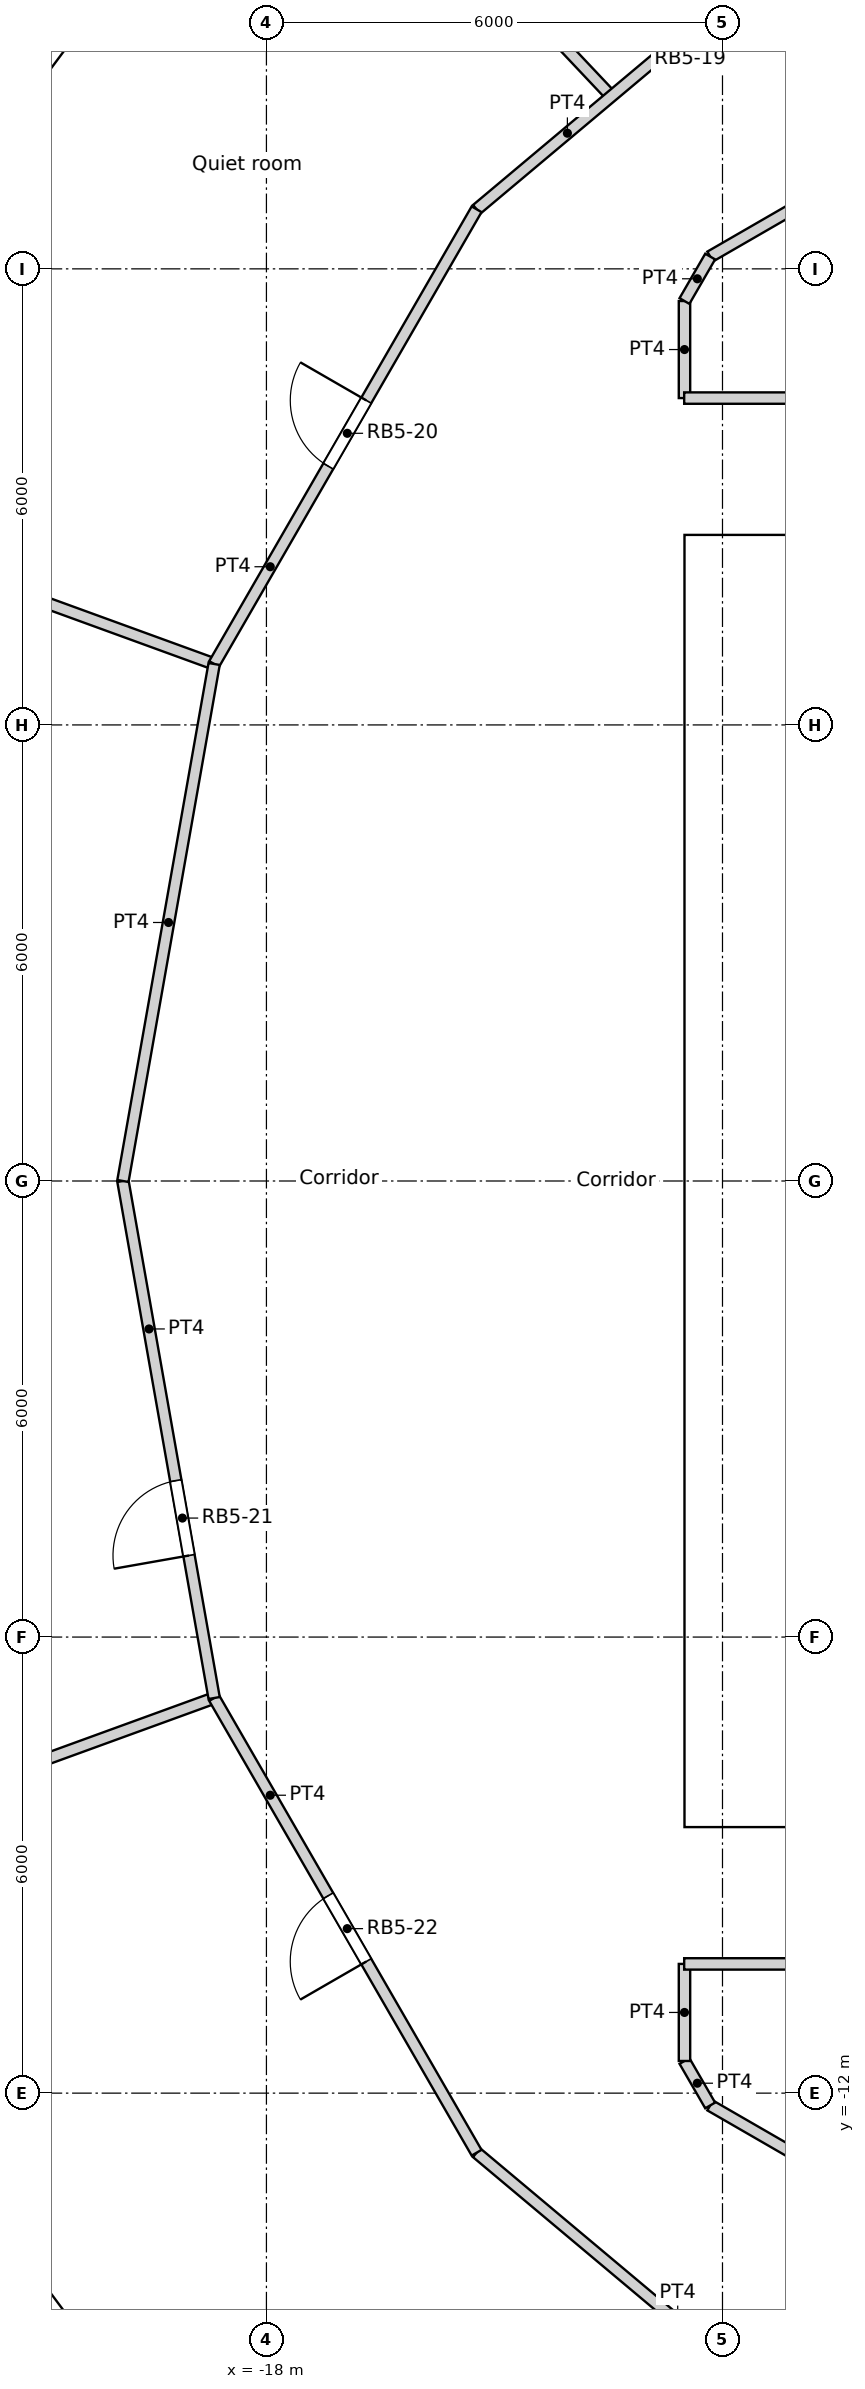
"""IFC4 building model, lengths in metres.
Left out: names, types, materials, properties, quantities, classifications, styles, units other than length and angle.
Written with IfcOpenShell. Run it as: python <this file> out.ifc"""

import sys

from ifc_helpers import new_model, si_unit, direction, frame, frame_2d, origin, origin_2d, place, context, subcontext, project, spatial, rectangle, circle, extrude, element, fill, save


model = new_model("IFC4")
c1 = context("Model", 3, precision=1e-05, world=origin(), true_north=direction((0.0, 1.0)))
c2 = subcontext(c1, "Body", "Model", "MODEL_VIEW")
j1 = project(units=[si_unit("LENGTHUNIT", "METRE"), si_unit("PLANEANGLEUNIT", "RADIAN")], contexts=[c1])
p1 = place(None, origin())
s1 = spatial("IfcSite", under=j1, at=p1, CompositionType="ELEMENT")
p2 = place(p1, origin())
s2 = spatial("IfcBuilding", under=s1, at=p2, CompositionType="ELEMENT")
p3 = place(p2, frame((0.0, 0.0, 169.2)))
s3 = spatial("IfcBuildingStorey", under=s2, at=p3, CompositionType="ELEMENT", Elevation=169.2)
for number, where, z_axis, x_axis in (
    (1, (-20.509, 13.489, 0.0), (0.0, 0.0, 1.0), (1.0, 0.0, 0.0)),
    (2, (-20.509, -13.489, 0.0), (0.0, 0.0, 1.0), (1.0, 0.0, 0.0)),
):
    element("IfcColumn", number, at=place(p3, frame(where, z_axis=z_axis, x_axis=x_axis)), inside=s3, PredefinedType="COLUMN", context=c2, shape_type="SweptSolid", body=[
        extrude(circle(Radius=0.6, at=origin_2d()), origin(), (0.0, 0.0, 1.0), 3.6),
    ])
for number, where, z_axis, x_axis in (
    (3, (-13.798, 12.802, 0.0), (0.0, 0.0, 1.0), (1.0, 0.0, 0.0)),
    (4, (-16.958, 8.167, 0.0), (0.0, 0.0, 1.0), (1.0, 0.0, 0.0)),
    (5, (-18.612, 2.805, 0.0), (0.0, 0.0, 1.0), (1.0, 0.0, 0.0)),
    (6, (-18.612, -2.805, 0.0), (0.0, 0.0, 1.0), (1.0, 0.0, 0.0)),
    (7, (-16.958, -8.167, 0.0), (0.0, 0.0, 1.0), (1.0, 0.0, 0.0)),
    (8, (-13.798, -12.802, 0.0), (0.0, 0.0, 1.0), (1.0, 0.0, 0.0)),
):
    element("IfcColumn", number, at=place(p3, frame(where, z_axis=z_axis, x_axis=x_axis)), inside=s3, PredefinedType="COLUMN", context=c2, shape_type="SweptSolid", body=[
        extrude(circle(Radius=0.65, at=origin_2d()), origin(), (0.0, 0.0, 1.0), 3.6),
    ])
p4 = place(p3, frame((-19.647, 16.486, 0.0), z_axis=(0.0, 0.0, 1.0), x_axis=(-0.597197580538, -0.80209416517, 0.0)))
e9 = element("IfcWall", 9, at=p4, inside=s3, PredefinedType="SOLIDWALL", context=c2, shape_type="SweptSolid", body=[
    extrude(rectangle(XDim=2.973, YDim=0.3, at=frame_2d((1.486, 0.0))), origin(), (0.0, 0.0, 1.0), 3.3),
])
p5 = place(p4, frame((1.486, 0.0, 1.55)))
e10 = element("IfcOpeningElement", 10, at=p5, cuts=e9, PredefinedType="OPENING", context=c2, shape_type="SweptSolid", body=[
    extrude(circle(Radius=0.9, at=origin_2d()), frame((0.0, 0.16, 0.0), z_axis=(0.0, -1.0, 0.0), x_axis=(1.0, 0.0, 0.0)), (0.0, 0.0, 1.0), 0.32),
])
p6 = place(p3, frame((-21.422, -14.101, 0.0), z_axis=(0.0, 0.0, 1.0), x_axis=(0.597197580538, -0.80209416517, 0.0)))
e11 = element("IfcWall", 11, at=p6, inside=s3, PredefinedType="SOLIDWALL", context=c2, shape_type="SweptSolid", body=[
    extrude(rectangle(XDim=2.973, YDim=0.3, at=frame_2d((1.486, 0.0))), origin(), (0.0, 0.0, 1.0), 3.3),
])
p7 = place(p6, frame((1.486, 0.0, 1.55)))
e12 = element("IfcOpeningElement", 12, at=p7, cuts=e11, PredefinedType="OPENING", context=c2, shape_type="SweptSolid", body=[
    extrude(circle(Radius=0.9, at=origin_2d()), frame((0.0, 0.16, 0.0), z_axis=(0.0, -1.0, 0.0), x_axis=(1.0, 0.0, 0.0)), (0.0, 0.0, 1.0), 0.32),
])
p8 = place(p3, frame((-12.5, -8.05, 0.0), z_axis=(0.0, 0.0, 1.0), x_axis=(1.0, 0.0, 0.0)))
e13 = element("IfcWall", 13, at=p8, inside=s3, PredefinedType="SOLIDWALL", context=c2, shape_type="SweptSolid", body=[
    extrude(rectangle(XDim=25.0, YDim=0.9, at=frame_2d((12.5, 0.0))), origin(), (0.0, 0.0, 1.0), 3.6),
])
p9 = place(p8, frame((13.4, 0.0, 0.0)))
e14 = element("IfcOpeningElement", 14, at=p9, cuts=e13, PredefinedType="OPENING", context=c2, shape_type="SweptSolid", body=[
    extrude(rectangle(XDim=1.0, YDim=2.1, at=frame_2d((0.5, 1.05))), frame((0.0, 0.45, 0.0), z_axis=(0.0, -1.0, 0.0), x_axis=(1.0, 0.0, 0.0)), (0.0, 0.0, 1.0), 0.9),
])
p10 = place(p8, frame((8.3, 0.0, 0.0)))
e15 = element("IfcOpeningElement", 15, at=p10, cuts=e13, PredefinedType="OPENING", context=c2, shape_type="SweptSolid", body=[
    extrude(rectangle(XDim=1.8, YDim=2.1, at=frame_2d((0.9, 1.05))), frame((0.0, 0.45, 0.0), z_axis=(0.0, -1.0, 0.0), x_axis=(1.0, 0.0, 0.0)), (0.0, 0.0, 1.0), 0.9),
])
p11 = place(p8, frame((14.9, 0.0, 0.0)))
e16 = element("IfcOpeningElement", 16, at=p11, cuts=e13, PredefinedType="OPENING", context=c2, shape_type="SweptSolid", body=[
    extrude(rectangle(XDim=1.8, YDim=2.1, at=frame_2d((0.9, 1.05))), frame((0.0, 0.45, 0.0), z_axis=(0.0, -1.0, 0.0), x_axis=(1.0, 0.0, 0.0)), (0.0, 0.0, 1.0), 0.9),
])
p12 = place(p3, frame((-12.5, 8.05, 0.0), z_axis=(0.0, 0.0, 1.0), x_axis=(1.0, 0.0, 0.0)))
e17 = element("IfcWall", 17, at=p12, inside=s3, PredefinedType="SOLIDWALL", context=c2, shape_type="SweptSolid", body=[
    extrude(rectangle(XDim=25.0, YDim=0.9, at=frame_2d((12.5, 0.0))), origin(), (0.0, 0.0, 1.0), 3.6),
])
p13 = place(p12, frame((8.3, 0.0, 0.0)))
e18 = element("IfcOpeningElement", 18, at=p13, cuts=e17, PredefinedType="OPENING", context=c2, shape_type="SweptSolid", body=[
    extrude(rectangle(XDim=1.8, YDim=2.1, at=frame_2d((0.9, 1.05))), frame((0.0, 0.45, 0.0), z_axis=(0.0, -1.0, 0.0), x_axis=(1.0, 0.0, 0.0)), (0.0, 0.0, 1.0), 0.9),
])
p14 = place(p3, frame((-12.05, -7.6, 0.0), z_axis=(0.0, 0.0, 1.0), x_axis=(0.0, 1.0, 0.0)))
e19 = element("IfcWall", 19, at=p14, inside=s3, PredefinedType="SOLIDWALL", context=c2, shape_type="SweptSolid", body=[
    extrude(rectangle(XDim=15.2, YDim=0.9, at=frame_2d((7.6, 0.0))), origin(), (0.0, 0.0, 1.0), 3.6),
])
p15 = place(p14, frame((7.1, 0.0, 0.0)))
e20 = element("IfcOpeningElement", 20, at=p15, cuts=e19, PredefinedType="OPENING", context=c2, shape_type="SweptSolid", body=[
    extrude(rectangle(XDim=1.0, YDim=2.1, at=frame_2d((0.5, 1.05))), frame((0.0, 0.45, 0.0), z_axis=(0.0, -1.0, 0.0), x_axis=(1.0, 0.0, 0.0)), (0.0, 0.0, 1.0), 0.9),
])
p16 = place(p3, frame((-11.6, -4.55, 0.0), z_axis=(0.0, 0.0, 1.0), x_axis=(1.0, 0.0, 0.0)))
e21 = element("IfcWall", 21, at=p16, inside=s3, PredefinedType="SOLIDWALL", context=c2, shape_type="SweptSolid", body=[
    extrude(rectangle(XDim=2.4, YDim=0.3, at=frame_2d((1.2, 0.0))), origin(), (0.0, 0.0, 1.0), 3.3),
])
p17 = place(p16, frame((0.65, 0.0, 0.0)))
e22 = element("IfcOpeningElement", 22, at=p17, cuts=e21, PredefinedType="OPENING", context=c2, shape_type="SweptSolid", body=[
    extrude(rectangle(XDim=1.1, YDim=2.1, at=frame_2d((0.55, 1.05))), frame((0.0, 0.15, 0.0), z_axis=(0.0, -1.0, 0.0), x_axis=(1.0, 0.0, 0.0)), (0.0, 0.0, 1.0), 0.3),
])
p18 = place(p3, frame((-11.6, 4.55, 0.0), z_axis=(0.0, 0.0, 1.0), x_axis=(1.0, 0.0, 0.0)))
e23 = element("IfcWall", 23, at=p18, inside=s3, PredefinedType="SOLIDWALL", context=c2, shape_type="SweptSolid", body=[
    extrude(rectangle(XDim=2.4, YDim=0.3, at=frame_2d((1.2, 0.0))), origin(), (0.0, 0.0, 1.0), 3.3),
])
p19 = place(p18, frame((0.65, 0.0, 0.0)))
e24 = element("IfcOpeningElement", 24, at=p19, cuts=e23, PredefinedType="OPENING", context=c2, shape_type="SweptSolid", body=[
    extrude(rectangle(XDim=1.1, YDim=2.1, at=frame_2d((0.55, 1.05))), frame((0.0, 0.15, 0.0), z_axis=(0.0, -1.0, 0.0), x_axis=(1.0, 0.0, 0.0)), (0.0, 0.0, 1.0), 0.3),
])
for number, where, z_axis, x_axis in (
    (25, (-12.504, 10.3, 0.0), (0.0, 0.0, 1.0), (1.0, 0.0, 0.0)),
    (26, (-12.504, -10.3, 0.0), (0.0, 0.0, 1.0), (1.0, 0.0, 0.0)),
):
    element("IfcWall", number, at=place(p3, frame(where, z_axis=z_axis, x_axis=x_axis)), inside=s3, PredefinedType="PARTITIONING", context=c2, shape_type="SweptSolid", body=[
        extrude(rectangle(XDim=7.687, YDim=0.15, at=frame_2d((3.844, 0.0))), origin(), (0.0, 0.0, 1.0), 3.3),
    ])
p20 = place(p3, frame((-12.162, 12.162, 0.0), z_axis=(0.0, 0.0, 1.0), x_axis=(0.866004766557, 0.500035743023, 0.0)))
e27 = element("IfcWall", 27, at=p20, inside=s3, PredefinedType="PARTITIONING", context=c2, shape_type="SweptSolid", body=[
    extrude(rectangle(XDim=8.477, YDim=0.15, at=frame_2d((4.239, 0.0))), origin(), (0.0, 0.0, 1.0), 3.3),
])
p21 = place(p20, frame((3.739, 0.0, 0.0)))
e28 = element("IfcOpeningElement", 28, at=p21, cuts=e27, PredefinedType="OPENING", context=c2, shape_type="SweptSolid", body=[
    extrude(rectangle(XDim=1.0, YDim=2.04, at=frame_2d((0.5, 1.02))), frame((0.0, 0.075, 0.0), z_axis=(0.0, -1.0, 0.0), x_axis=(1.0, 0.0, 0.0)), (0.0, 0.0, 1.0), 0.15),
])
p22 = place(p3, frame((-15.234, 12.783, 0.0), z_axis=(0.0, 0.0, 1.0), x_axis=(0.765918610974, 0.642937540795, 0.0)))
e29 = element("IfcWall", 29, at=p22, inside=s3, PredefinedType="PARTITIONING", context=c2, shape_type="SweptSolid", body=[
    extrude(rectangle(XDim=6.906, YDim=0.15, at=frame_2d((3.453, 0.0))), origin(), (0.0, 0.0, 1.0), 3.3),
])
p23 = place(p22, frame((3.167, 0.0, 0.0)))
e30 = element("IfcOpeningElement", 30, at=p23, cuts=e29, PredefinedType="OPENING", context=c2, shape_type="SweptSolid", body=[
    extrude(rectangle(XDim=1.0, YDim=2.1, at=frame_2d((0.5, 1.05))), frame((0.0, 0.075, 0.0), z_axis=(0.0, -1.0, 0.0), x_axis=(1.0, 0.0, 0.0)), (0.0, 0.0, 1.0), 0.15),
])
p24 = place(p3, frame((-12.5, 11.577, 0.0), z_axis=(0.0, 0.0, 1.0), x_axis=(0.500024767483, 0.866011103799, 0.0)))
e31 = element("IfcWall", 31, at=p24, inside=s3, PredefinedType="PARTITIONING", context=c2, shape_type="SweptSolid", body=[
    extrude(rectangle(XDim=0.676, YDim=0.15, at=frame_2d((0.338, 0.0))), origin(), (0.0, 0.0, 1.0), 3.3),
])
for number, where, z_axis, x_axis in (
    (32, (-12.5, 10.3, 0.0), (0.0, 0.0, 1.0), (0.0, 1.0, 0.0)),
    (33, (-12.5, -11.577, 0.0), (0.0, 0.0, 1.0), (0.0, 1.0, 0.0)),
):
    element("IfcWall", number, at=place(p3, frame(where, z_axis=z_axis, x_axis=x_axis)), inside=s3, PredefinedType="PARTITIONING", context=c2, shape_type="SweptSolid", body=[
        extrude(rectangle(XDim=1.277, YDim=0.15, at=frame_2d((0.638, 0.0))), origin(), (0.0, 0.0, 1.0), 3.3),
    ])
p25 = place(p3, frame((-12.5, -11.577, 0.0), z_axis=(0.0, 0.0, 1.0), x_axis=(0.500024767483, -0.866011103799, 0.0)))
e34 = element("IfcWall", 34, at=p25, inside=s3, PredefinedType="PARTITIONING", context=c2, shape_type="SweptSolid", body=[
    extrude(rectangle(XDim=0.676, YDim=0.15, at=frame_2d((0.338, 0.0))), origin(), (0.0, 0.0, 1.0), 3.3),
])
p26 = place(p3, frame((-18.688, 6.802, 0.0), z_axis=(0.0, 0.0, 1.0), x_axis=(0.499914202267, 0.866074933462, 0.0)))
e35 = element("IfcWall", 35, at=p26, inside=s3, PredefinedType="PARTITIONING", context=c2, shape_type="SweptSolid", body=[
    extrude(rectangle(XDim=6.907, YDim=0.15, at=frame_2d((3.454, 0.0))), origin(), (0.0, 0.0, 1.0), 3.3),
])
p27 = place(p26, frame((3.004, 0.0, 0.0)))
e36 = element("IfcOpeningElement", 36, at=p27, cuts=e35, PredefinedType="OPENING", context=c2, shape_type="SweptSolid", body=[
    extrude(rectangle(XDim=1.0, YDim=2.04, at=frame_2d((0.5, 1.02))), frame((0.0, 0.075, 0.0), z_axis=(0.0, -1.0, 0.0), x_axis=(1.0, 0.0, 0.0)), (0.0, 0.0, 1.0), 0.15),
])
p28 = place(p3, frame((-19.888, 0.0, 0.0), z_axis=(0.0, 0.0, 1.0), x_axis=(0.173728873845, -0.98479352069, 0.0)))
e37 = element("IfcWall", 37, at=p28, inside=s3, PredefinedType="PARTITIONING", context=c2, shape_type="SweptSolid", body=[
    extrude(rectangle(XDim=6.907, YDim=0.15, at=frame_2d((3.454, 0.0))), origin(), (0.0, 0.0, 1.0), 3.3),
])
p29 = place(p28, frame((4.003, 0.0, 0.0)))
e38 = element("IfcOpeningElement", 38, at=p29, cuts=e37, PredefinedType="OPENING", context=c2, shape_type="SweptSolid", body=[
    extrude(rectangle(XDim=1.0, YDim=2.04, at=frame_2d((0.5, 1.02))), frame((0.0, 0.075, 0.0), z_axis=(0.0, -1.0, 0.0), x_axis=(1.0, 0.0, 0.0)), (0.0, 0.0, 1.0), 0.15),
])
p30 = place(p3, frame((-19.888, 0.0, 0.0), z_axis=(0.0, 0.0, 1.0), x_axis=(0.173728873845, 0.98479352069, 0.0)))
e39 = element("IfcWall", 39, at=p30, inside=s3, PredefinedType="PARTITIONING", context=c2, shape_type="SweptSolid", body=[
    extrude(rectangle(XDim=6.907, YDim=0.15, at=frame_2d((3.454, 0.0))), origin(), (0.0, 0.0, 1.0), 3.3),
])
p31 = place(p3, frame((-15.235, -12.784, 0.0), z_axis=(0.0, 0.0, 1.0), x_axis=(0.766192104565, -0.642611592567, 0.0)))
e40 = element("IfcWall", 40, at=p31, inside=s3, PredefinedType="PARTITIONING", context=c2, shape_type="SweptSolid", body=[
    extrude(rectangle(XDim=6.906, YDim=0.15, at=frame_2d((3.453, 0.0))), origin(), (0.0, 0.0, 1.0), 3.3),
])
p32 = place(p3, frame((-18.688, -6.802, 0.0), z_axis=(0.0, 0.0, 1.0), x_axis=(0.499914202267, -0.866074933462, 0.0)))
e41 = element("IfcWall", 41, at=p32, inside=s3, PredefinedType="PARTITIONING", context=c2, shape_type="SweptSolid", body=[
    extrude(rectangle(XDim=6.907, YDim=0.15, at=frame_2d((3.454, 0.0))), origin(), (0.0, 0.0, 1.0), 3.3),
])
p33 = place(p32, frame((3.003, 0.0, 0.0)))
e42 = element("IfcOpeningElement", 42, at=p33, cuts=e41, PredefinedType="OPENING", context=c2, shape_type="SweptSolid", body=[
    extrude(rectangle(XDim=1.0, YDim=2.04, at=frame_2d((0.5, 1.02))), frame((0.0, 0.075, 0.0), z_axis=(0.0, -1.0, 0.0), x_axis=(1.0, 0.0, 0.0)), (0.0, 0.0, 1.0), 0.15),
])
p34 = place(p3, frame((-12.162, -12.162, 0.0), z_axis=(0.0, 0.0, 1.0), x_axis=(0.866004766557, -0.500035743023, 0.0)))
e43 = element("IfcWall", 43, at=p34, inside=s3, PredefinedType="PARTITIONING", context=c2, shape_type="SweptSolid", body=[
    extrude(rectangle(XDim=8.477, YDim=0.15, at=frame_2d((4.239, 0.0))), origin(), (0.0, 0.0, 1.0), 3.3),
])
p35 = place(p34, frame((3.763, 0.0, 0.0)))
e44 = element("IfcOpeningElement", 44, at=p35, cuts=e43, PredefinedType="OPENING", context=c2, shape_type="SweptSolid", body=[
    extrude(rectangle(XDim=0.95, YDim=2.1, at=frame_2d((0.475, 1.05))), frame((0.0, 0.075, 0.0), z_axis=(0.0, -1.0, 0.0), x_axis=(1.0, 0.0, 0.0)), (0.0, 0.0, 1.0), 0.15),
])
p36 = place(p3, frame((-17.497, 18.546, 0.0), z_axis=(0.0, 0.0, 1.0), x_axis=(0.6862502776, -0.72736549031, 0.0)))
e45 = element("IfcWall", 45, at=p36, inside=s3, PredefinedType="PARTITIONING", context=c2, shape_type="SweptSolid", body=[
    extrude(rectangle(XDim=5.879, YDim=0.15, at=frame_2d((2.939, 0.0))), origin(), (0.0, 0.0, 1.0), 3.3),
])
for number, where, z_axis, x_axis in (
    (46, (-23.96, 8.721, 0.0), (0.0, 0.0, 1.0), (0.94, -0.342, 0.0)),
    (47, (-23.96, -8.721, 0.0), (0.0, 0.0, 1.0), (0.94, 0.342, 0.0)),
):
    element("IfcWall", number, at=place(p3, frame(where, z_axis=z_axis, x_axis=x_axis)), inside=s3, PredefinedType="PARTITIONING", context=c2, shape_type="SweptSolid", body=[
        extrude(rectangle(XDim=5.61, YDim=0.15, at=frame_2d((2.805, 0.0))), origin(), (0.0, 0.0, 1.0), 3.3),
    ])
p37 = place(p5, origin())
e48 = element("IfcWindow", 48, at=p37, inside=s3, PartitioningType="SINGLE_PANEL", PredefinedType="WINDOW", context=c2, shape_type="SweptSolid", body=[
    extrude(circle(Radius=0.9, at=origin_2d()), frame((0.0, 0.12, 0.0), z_axis=(0.0, -1.0, 0.0), x_axis=(1.0, 0.0, 0.0)), (0.0, 0.0, 1.0), 0.1),
])
fill(e10, e48)
p38 = place(p7, origin())
e49 = element("IfcWindow", 49, at=p38, inside=s3, PartitioningType="SINGLE_PANEL", PredefinedType="WINDOW", context=c2, shape_type="SweptSolid", body=[
    extrude(circle(Radius=0.9, at=origin_2d()), frame((0.0, 0.12, 0.0), z_axis=(0.0, -1.0, 0.0), x_axis=(1.0, 0.0, 0.0)), (0.0, 0.0, 1.0), 0.1),
])
fill(e12, e49)
p39 = place(p15, origin())
e50 = element("IfcDoor", 50, at=p39, inside=s3, OperationType="DOUBLE_DOOR_SINGLE_SWING", PredefinedType="DOOR", context=c2, shape_type="SweptSolid", body=[
    extrude(rectangle(XDim=1.0, YDim=2.1, at=frame_2d((0.5, 1.05))), frame((0.0, 0.025, 0.0), z_axis=(0.0, -1.0, 0.0), x_axis=(1.0, 0.0, 0.0)), (0.0, 0.0, 1.0), 0.05),
])
fill(e20, e50)
p40 = place(p23, origin())
e51 = element("IfcDoor", 51, at=p40, inside=s3, OperationType="SINGLE_SWING_RIGHT", PredefinedType="DOOR", context=c2, shape_type="SweptSolid", body=[
    extrude(rectangle(XDim=1.0, YDim=2.1, at=frame_2d((0.5, 1.05))), frame((0.0, 0.025, 0.0), z_axis=(0.0, -1.0, 0.0), x_axis=(1.0, 0.0, 0.0)), (0.0, 0.0, 1.0), 0.05),
])
fill(e30, e51)
p41 = place(p27, origin())
e52 = element("IfcDoor", 52, at=p41, inside=s3, OperationType="SINGLE_SWING_RIGHT", PredefinedType="DOOR", context=c2, shape_type="SweptSolid", body=[
    extrude(rectangle(XDim=1.0, YDim=2.04, at=frame_2d((0.5, 1.02))), frame((0.0, 0.025, 0.0), z_axis=(0.0, -1.0, 0.0), x_axis=(1.0, 0.0, 0.0)), (0.0, 0.0, 1.0), 0.05),
])
fill(e36, e52)
p42 = place(p29, origin())
e53 = element("IfcDoor", 53, at=p42, inside=s3, OperationType="SINGLE_SWING_LEFT", PredefinedType="DOOR", context=c2, shape_type="SweptSolid", body=[
    extrude(rectangle(XDim=1.0, YDim=2.04, at=frame_2d((0.5, 1.02))), frame((0.0, 0.025, 0.0), z_axis=(0.0, -1.0, 0.0), x_axis=(1.0, 0.0, 0.0)), (0.0, 0.0, 1.0), 0.05),
])
fill(e38, e53)
p43 = place(p33, origin())
e54 = element("IfcDoor", 54, at=p43, inside=s3, OperationType="SINGLE_SWING_LEFT", PredefinedType="DOOR", context=c2, shape_type="SweptSolid", body=[
    extrude(rectangle(XDim=1.0, YDim=2.04, at=frame_2d((0.5, 1.02))), frame((0.0, 0.025, 0.0), z_axis=(0.0, -1.0, 0.0), x_axis=(1.0, 0.0, 0.0)), (0.0, 0.0, 1.0), 0.05),
])
fill(e42, e54)
save(model, sys.argv[1])
